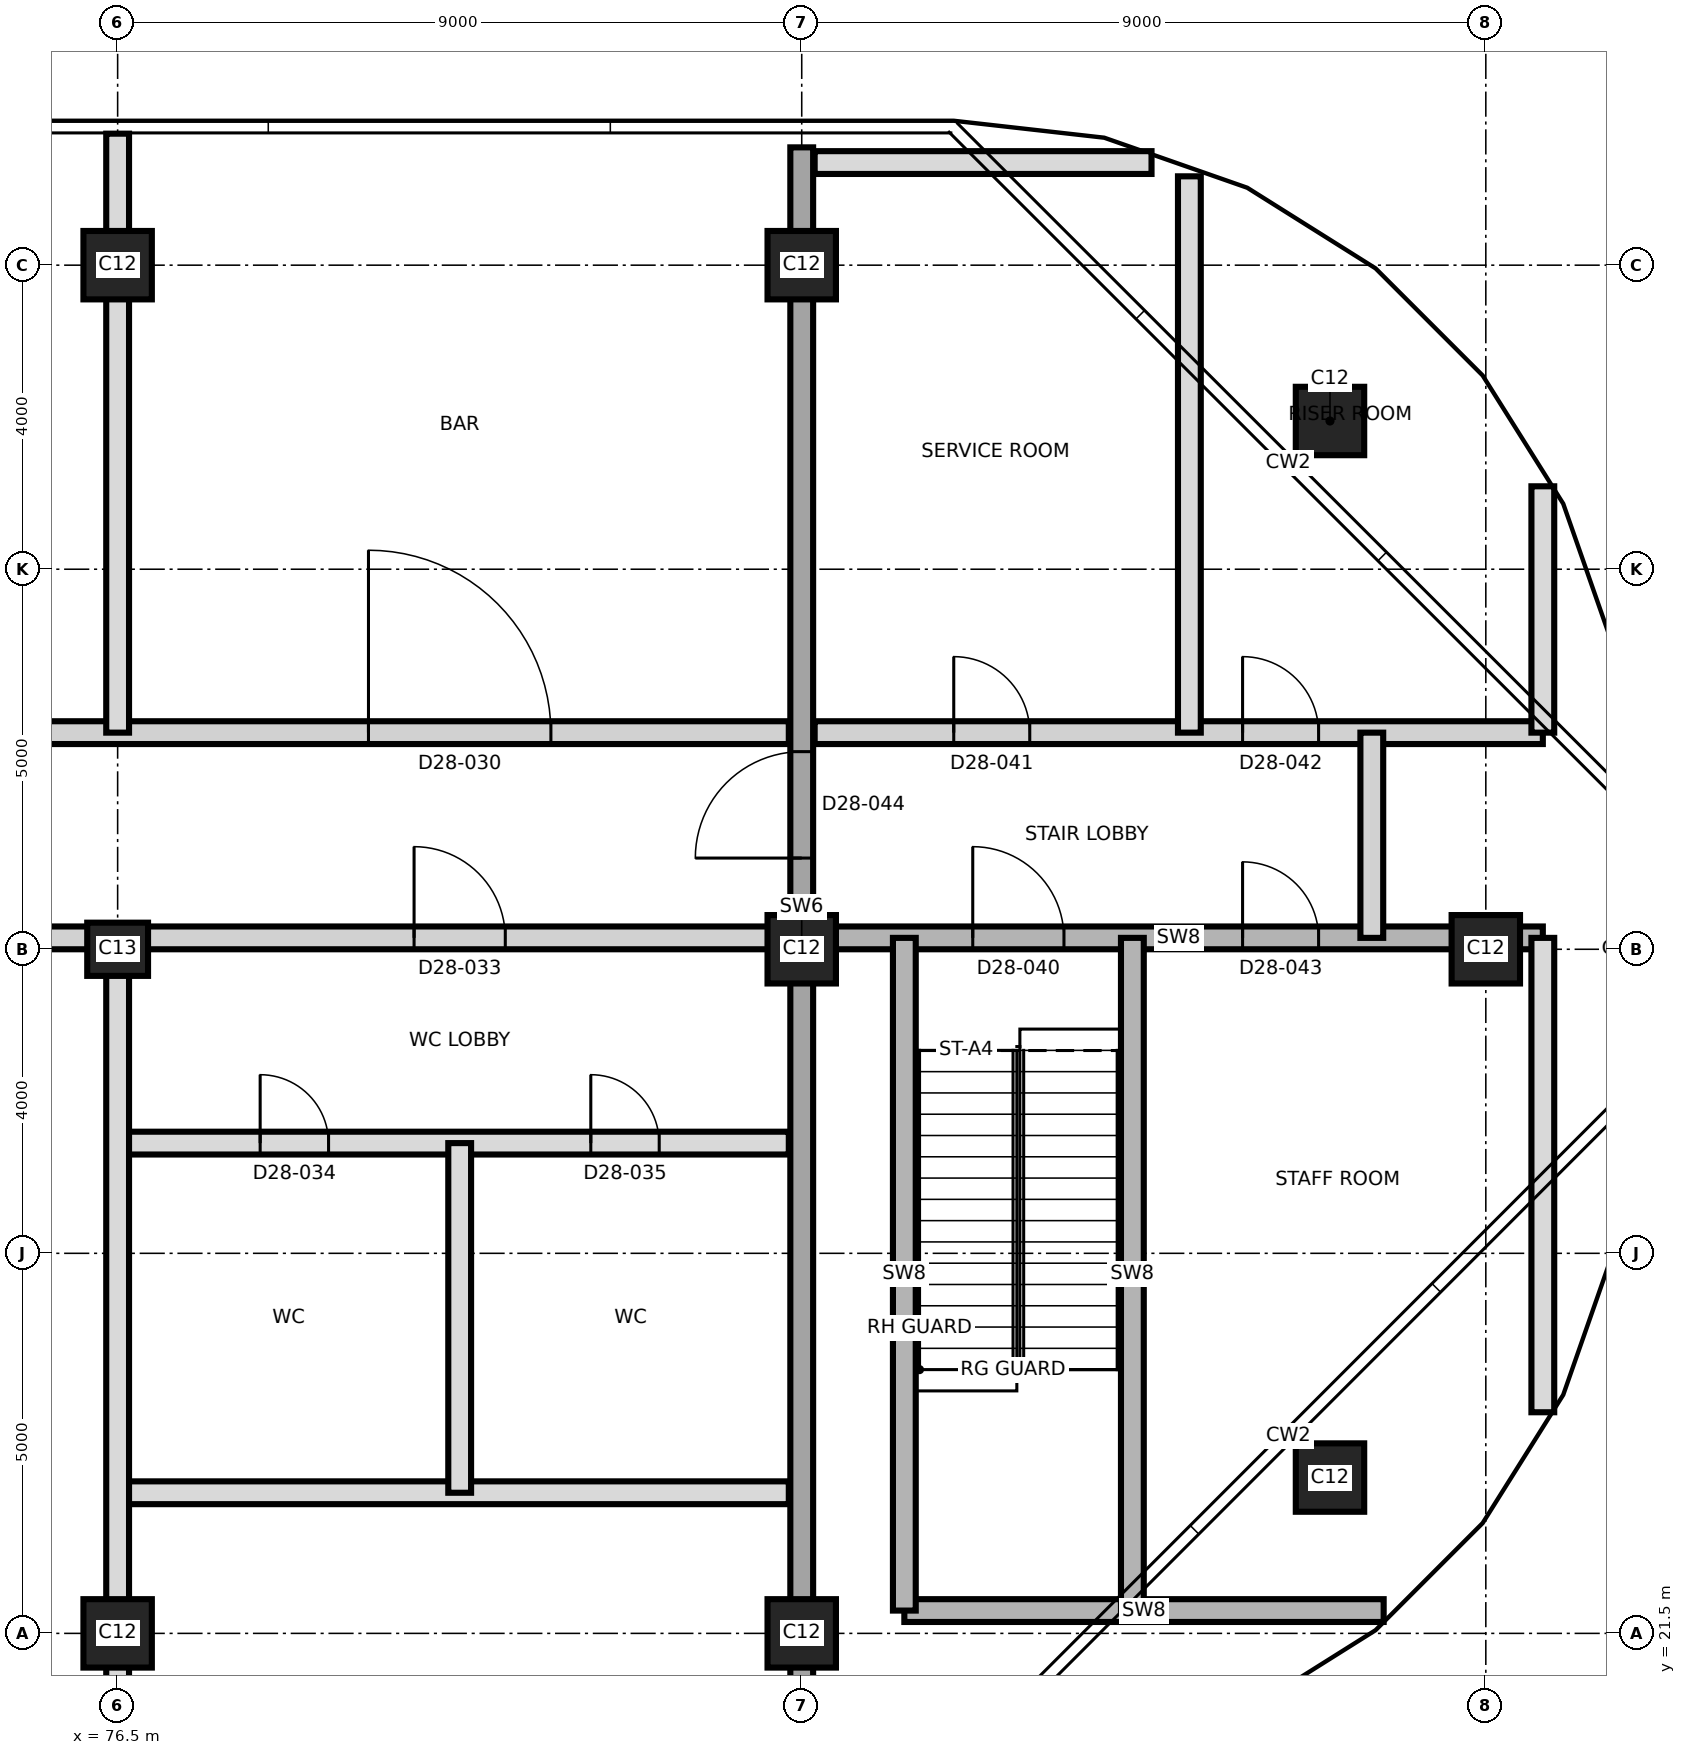
"""IFC4 building model, lengths in metres.
Left out: names, types, materials, properties, quantities, classifications, styles, units other than length and angle.
Written with IfcOpenShell. Run it as: python <this file> out.ifc"""

import sys

from ifc_helpers import new_model, si_unit, direction, frame, frame_2d, origin, origin_2d, place, context, subcontext, project, spatial, rectangle, extrude, element, fill, save


model = new_model("IFC4")
c1 = context("Model", 3, precision=1e-05, world=origin(), true_north=direction((0.0, 1.0)))
c2 = subcontext(c1, "Body", "Model", "MODEL_VIEW")
j1 = project(units=[si_unit("LENGTHUNIT", "METRE"), si_unit("PLANEANGLEUNIT", "RADIAN")], contexts=[c1])
p1 = place(None, origin())
s1 = spatial("IfcSite", under=j1, at=p1, CompositionType="ELEMENT")
p2 = place(p1, origin())
s2 = spatial("IfcBuilding", under=s1, at=p2, CompositionType="ELEMENT")
p3 = place(p2, frame((0.0, 0.0, 249.4)))
s3 = spatial("IfcBuildingStorey", under=s2, at=p3, CompositionType="ELEMENT", Elevation=249.4)
for number, where, z_axis, x_axis in (
    (1, (76.5, 21.5, 0.0), (0.0, 0.0, 1.0), (1.0, 0.0, 0.0)),
    (2, (85.5, 21.5, 0.0), (0.0, 0.0, 1.0), (1.0, 0.0, 0.0)),
    (3, (92.45, 23.55, 0.0), (0.0, 0.0, 1.0), (1.0, 0.0, 0.0)),
):
    element("IfcColumn", number, at=place(p3, frame(where, z_axis=z_axis, x_axis=x_axis)), inside=s3, PredefinedType="COLUMN", context=c2, shape_type="SweptSolid", body=[
        extrude(rectangle(XDim=0.9, YDim=0.9, at=origin_2d()), origin(), (0.0, 0.0, 1.0), 5.5),
    ])
p4 = place(p3, frame((76.5, 30.5, 0.0), z_axis=(0.0, 0.0, 1.0), x_axis=(1.0, 0.0, 0.0)))
e4 = element("IfcColumn", 4, at=p4, inside=s3, PredefinedType="COLUMN", context=c2, shape_type="SweptSolid", body=[
    extrude(rectangle(XDim=0.8, YDim=0.7, at=origin_2d()), origin(), (0.0, 0.0, 1.0), 5.5),
])
for number, where, z_axis, x_axis in (
    (5, (85.5, 30.5, 0.0), (0.0, 0.0, 1.0), (1.0, 0.0, 0.0)),
    (6, (94.5, 30.5, 0.0), (0.0, 0.0, 1.0), (1.0, 0.0, 0.0)),
    (7, (92.45, 37.45, 0.0), (0.0, 0.0, 1.0), (1.0, 0.0, 0.0)),
    (8, (76.5, 39.5, 0.0), (0.0, 0.0, 1.0), (1.0, 0.0, 0.0)),
    (9, (85.5, 39.5, 0.0), (0.0, 0.0, 1.0), (1.0, 0.0, 0.0)),
):
    element("IfcColumn", number, at=place(p3, frame(where, z_axis=z_axis, x_axis=x_axis)), inside=s3, PredefinedType="COLUMN", context=c2, shape_type="SweptSolid", body=[
        extrude(rectangle(XDim=0.9, YDim=0.9, at=origin_2d()), origin(), (0.0, 0.0, 1.0), 5.5),
    ])
p5 = place(p3, frame((85.5, 19.95, 0.0), z_axis=(0.0, 0.0, 1.0), x_axis=(0.0, 1.0, 0.0)))
e10 = element("IfcWall", 10, at=p5, inside=s3, PredefinedType="SHEAR", context=c2, shape_type="SweptSolid", body=[
    extrude(rectangle(XDim=21.1, YDim=0.3, at=frame_2d((10.55, 0.0))), origin(), (0.0, 0.0, 1.0), 5.5),
])
p6 = place(p5, frame((11.75, 0.0, 0.0)))
e11 = element("IfcOpeningElement", 11, at=p6, cuts=e10, PredefinedType="OPENING", context=c2, shape_type="SweptSolid", body=[
    extrude(rectangle(XDim=1.4, YDim=2.1, at=frame_2d((0.7, 1.05))), frame((0.0, 0.16, 0.0), z_axis=(0.0, -1.0, 0.0), x_axis=(1.0, 0.0, 0.0)), (0.0, 0.0, 1.0), 0.32),
])
p7 = place(p3, frame((86.85, 21.8, 0.0), z_axis=(0.0, 0.0, 1.0), x_axis=(1.0, 0.0, 0.0)))
e12 = element("IfcWall", 12, at=p7, inside=s3, PredefinedType="SHEAR", context=c2, shape_type="SweptSolid", body=[
    extrude(rectangle(XDim=6.306, YDim=0.3, at=frame_2d((3.153, 0.0))), origin(), (0.0, 0.0, 1.0), 5.2),
])
p8 = place(p3, frame((76.5, 23.35, 0.0), z_axis=(0.0, 0.0, 1.0), x_axis=(1.0, 0.0, 0.0)))
e13 = element("IfcWall", 13, at=p8, inside=s3, PredefinedType="PARTITIONING", context=c2, shape_type="SweptSolid", body=[
    extrude(rectangle(XDim=8.83, YDim=0.3, at=frame_2d((4.415, 0.0))), origin(), (0.0, 0.0, 1.0), 5.2),
])
p9 = place(p3, frame((76.5, 27.95, 0.0), z_axis=(0.0, 0.0, 1.0), x_axis=(1.0, 0.0, 0.0)))
e14 = element("IfcWall", 14, at=p9, inside=s3, PredefinedType="PARTITIONING", context=c2, shape_type="SweptSolid", body=[
    extrude(rectangle(XDim=8.83, YDim=0.3, at=frame_2d((4.415, 0.0))), origin(), (0.0, 0.0, 1.0), 5.2),
])
p10 = place(p9, frame((1.875, 0.0, 0.0)))
e15 = element("IfcOpeningElement", 15, at=p10, cuts=e14, PredefinedType="OPENING", context=c2, shape_type="SweptSolid", body=[
    extrude(rectangle(XDim=0.9, YDim=2.1, at=frame_2d((0.45, 1.05))), frame((0.0, 0.16, 0.0), z_axis=(0.0, -1.0, 0.0), x_axis=(1.0, 0.0, 0.0)), (0.0, 0.0, 1.0), 0.32),
])
p11 = place(p9, frame((6.225, 0.0, 0.0)))
e16 = element("IfcOpeningElement", 16, at=p11, cuts=e14, PredefinedType="OPENING", context=c2, shape_type="SweptSolid", body=[
    extrude(rectangle(XDim=0.9, YDim=2.1, at=frame_2d((0.45, 1.05))), frame((0.0, 0.16, 0.0), z_axis=(0.0, -1.0, 0.0), x_axis=(1.0, 0.0, 0.0)), (0.0, 0.0, 1.0), 0.32),
])
p12 = place(p3, frame((58.55, 30.65, 0.0), z_axis=(0.0, 0.0, 1.0), x_axis=(1.0, 0.0, 0.0)))
e17 = element("IfcWall", 17, at=p12, inside=s3, PredefinedType="PARTITIONING", context=c2, shape_type="SweptSolid", body=[
    extrude(rectangle(XDim=26.78, YDim=0.3, at=frame_2d((13.39, 0.0))), origin(), (0.0, 0.0, 1.0), 5.2),
])
p13 = place(p12, frame((3.75, 0.0, 0.0)))
e18 = element("IfcOpeningElement", 18, at=p13, cuts=e17, PredefinedType="OPENING", context=c2, shape_type="SweptSolid", body=[
    extrude(rectangle(XDim=1.4, YDim=2.1, at=frame_2d((0.7, 1.05))), frame((0.0, 0.16, 0.0), z_axis=(0.0, -1.0, 0.0), x_axis=(1.0, 0.0, 0.0)), (0.0, 0.0, 1.0), 0.32),
])
p14 = place(p12, frame((12.75, 0.0, 0.0)))
e19 = element("IfcOpeningElement", 19, at=p14, cuts=e17, PredefinedType="OPENING", context=c2, shape_type="SweptSolid", body=[
    extrude(rectangle(XDim=1.4, YDim=2.1, at=frame_2d((0.7, 1.05))), frame((0.0, 0.16, 0.0), z_axis=(0.0, -1.0, 0.0), x_axis=(1.0, 0.0, 0.0)), (0.0, 0.0, 1.0), 0.32),
])
p15 = place(p12, frame((21.85, 0.0, 0.0)))
e20 = element("IfcOpeningElement", 20, at=p15, cuts=e17, PredefinedType="OPENING", context=c2, shape_type="SweptSolid", body=[
    extrude(rectangle(XDim=1.2, YDim=2.1, at=frame_2d((0.6, 1.05))), frame((0.0, 0.16, 0.0), z_axis=(0.0, -1.0, 0.0), x_axis=(1.0, 0.0, 0.0)), (0.0, 0.0, 1.0), 0.32),
])
p16 = place(p3, frame((85.67, 30.65, 0.0), z_axis=(0.0, 0.0, 1.0), x_axis=(1.0, 0.0, 0.0)))
e21 = element("IfcWall", 21, at=p16, inside=s3, PredefinedType="SHEAR", context=c2, shape_type="SweptSolid", body=[
    extrude(rectangle(XDim=9.58, YDim=0.3, at=frame_2d((4.79, 0.0))), origin(), (0.0, 0.0, 1.0), 5.2),
])
p17 = place(p16, frame((2.08, 0.0, 0.0)))
e22 = element("IfcOpeningElement", 22, at=p17, cuts=e21, PredefinedType="OPENING", context=c2, shape_type="SweptSolid", body=[
    extrude(rectangle(XDim=1.2, YDim=2.1, at=frame_2d((0.6, 1.05))), frame((0.0, 0.16, 0.0), z_axis=(0.0, -1.0, 0.0), x_axis=(1.0, 0.0, 0.0)), (0.0, 0.0, 1.0), 0.32),
])
p18 = place(p16, frame((5.63, 0.0, 0.0)))
e23 = element("IfcOpeningElement", 23, at=p18, cuts=e21, PredefinedType="OPENING", context=c2, shape_type="SweptSolid", body=[
    extrude(rectangle(XDim=1.0, YDim=2.1, at=frame_2d((0.5, 1.05))), frame((0.0, 0.16, 0.0), z_axis=(0.0, -1.0, 0.0), x_axis=(1.0, 0.0, 0.0)), (0.0, 0.0, 1.0), 0.32),
])
p19 = place(p3, frame((58.55, 33.35, 0.0), z_axis=(0.0, 0.0, 1.0), x_axis=(1.0, 0.0, 0.0)))
e24 = element("IfcWall", 24, at=p19, inside=s3, PredefinedType="PARTITIONING", context=c2, shape_type="SweptSolid", body=[
    extrude(rectangle(XDim=26.78, YDim=0.3, at=frame_2d((13.39, 0.0))), origin(), (0.0, 0.0, 1.0), 5.2),
])
p20 = place(p19, frame((7.75, 0.0, 0.0)))
e25 = element("IfcOpeningElement", 25, at=p20, cuts=e24, PredefinedType="OPENING", context=c2, shape_type="SweptSolid", body=[
    extrude(rectangle(XDim=2.4, YDim=2.4, at=frame_2d((1.2, 1.2))), frame((0.0, 0.16, 0.0), z_axis=(0.0, -1.0, 0.0), x_axis=(1.0, 0.0, 0.0)), (0.0, 0.0, 1.0), 0.32),
])
p21 = place(p19, frame((21.25, 0.0, 0.0)))
e26 = element("IfcOpeningElement", 26, at=p21, cuts=e24, PredefinedType="OPENING", context=c2, shape_type="SweptSolid", body=[
    extrude(rectangle(XDim=2.4, YDim=2.4, at=frame_2d((1.2, 1.2))), frame((0.0, 0.16, 0.0), z_axis=(0.0, -1.0, 0.0), x_axis=(1.0, 0.0, 0.0)), (0.0, 0.0, 1.0), 0.32),
])
p22 = place(p3, frame((85.67, 33.35, 0.0), z_axis=(0.0, 0.0, 1.0), x_axis=(1.0, 0.0, 0.0)))
e27 = element("IfcWall", 27, at=p22, inside=s3, PredefinedType="PARTITIONING", context=c2, shape_type="SweptSolid", body=[
    extrude(rectangle(XDim=9.58, YDim=0.3, at=frame_2d((4.79, 0.0))), origin(), (0.0, 0.0, 1.0), 5.2),
])
p23 = place(p22, frame((1.83, 0.0, 0.0)))
e28 = element("IfcOpeningElement", 28, at=p23, cuts=e27, PredefinedType="OPENING", context=c2, shape_type="SweptSolid", body=[
    extrude(rectangle(XDim=1.0, YDim=2.1, at=frame_2d((0.5, 1.05))), frame((0.0, 0.16, 0.0), z_axis=(0.0, -1.0, 0.0), x_axis=(1.0, 0.0, 0.0)), (0.0, 0.0, 1.0), 0.32),
])
p24 = place(p22, frame((5.63, 0.0, 0.0)))
e29 = element("IfcOpeningElement", 29, at=p24, cuts=e27, PredefinedType="OPENING", context=c2, shape_type="SweptSolid", body=[
    extrude(rectangle(XDim=1.0, YDim=2.1, at=frame_2d((0.5, 1.05))), frame((0.0, 0.16, 0.0), z_axis=(0.0, -1.0, 0.0), x_axis=(1.0, 0.0, 0.0)), (0.0, 0.0, 1.0), 0.32),
])
p25 = place(p3, frame((85.67, 40.85, 0.0), z_axis=(0.0, 0.0, 1.0), x_axis=(1.0, 0.0, 0.0)))
e30 = element("IfcWall", 30, at=p25, inside=s3, PredefinedType="PARTITIONING", context=c2, shape_type="SweptSolid", body=[
    extrude(rectangle(XDim=4.432, YDim=0.3, at=frame_2d((2.216, 0.0))), origin(), (0.0, 0.0, 1.0), 5.2),
])
p26 = place(p3, frame((76.5, 19.77, 0.0), z_axis=(0.0, 0.0, 1.0), x_axis=(0.0, 1.0, 0.0)))
e31 = element("IfcWall", 31, at=p26, inside=s3, PredefinedType="PARTITIONING", context=c2, shape_type="SweptSolid", body=[
    extrude(rectangle(XDim=10.88, YDim=0.3, at=frame_2d((5.44, 0.0))), origin(), (0.0, 0.0, 1.0), 5.2),
])
p27 = place(p3, frame((76.5, 33.35, 0.0), z_axis=(0.0, 0.0, 1.0), x_axis=(0.0, 1.0, 0.0)))
e32 = element("IfcWall", 32, at=p27, inside=s3, PredefinedType="PARTITIONING", context=c2, shape_type="SweptSolid", body=[
    extrude(rectangle(XDim=7.88, YDim=0.3, at=frame_2d((3.94, 0.0))), origin(), (0.0, 0.0, 1.0), 5.2),
])
p28 = place(p3, frame((81.0, 23.35, 0.0), z_axis=(0.0, 0.0, 1.0), x_axis=(0.0, 1.0, 0.0)))
e33 = element("IfcWall", 33, at=p28, inside=s3, PredefinedType="PARTITIONING", context=c2, shape_type="SweptSolid", body=[
    extrude(rectangle(XDim=4.6, YDim=0.3, at=frame_2d((2.3, 0.0))), origin(), (0.0, 0.0, 1.0), 5.2),
])
for number, where, z_axis, x_axis in (
    (34, (86.85, 21.8, 0.0), (0.0, 0.0, 1.0), (0.0, 1.0, 0.0)),
    (35, (89.85, 21.8, 0.0), (0.0, 0.0, 1.0), (0.0, 1.0, 0.0)),
):
    element("IfcWall", number, at=place(p3, frame(where, z_axis=z_axis, x_axis=x_axis)), inside=s3, PredefinedType="SHEAR", context=c2, shape_type="SweptSolid", body=[
        extrude(rectangle(XDim=8.85, YDim=0.3, at=frame_2d((4.425, 0.0))), origin(), (0.0, 0.0, 1.0), 5.2),
    ])
p29 = place(p3, frame((90.6, 33.35, 0.0), z_axis=(0.0, 0.0, 1.0), x_axis=(0.0, 1.0, 0.0)))
e36 = element("IfcWall", 36, at=p29, inside=s3, PredefinedType="PARTITIONING", context=c2, shape_type="SweptSolid", body=[
    extrude(rectangle(XDim=7.319, YDim=0.3, at=frame_2d((3.659, 0.0))), origin(), (0.0, 0.0, 1.0), 5.2),
])
p30 = place(p3, frame((93.0, 30.65, 0.0), z_axis=(0.0, 0.0, 1.0), x_axis=(0.0, 1.0, 0.0)))
e37 = element("IfcWall", 37, at=p30, inside=s3, PredefinedType="PARTITIONING", context=c2, shape_type="SweptSolid", body=[
    extrude(rectangle(XDim=2.7, YDim=0.3, at=frame_2d((1.35, 0.0))), origin(), (0.0, 0.0, 1.0), 5.2),
])
p31 = place(p3, frame((95.25, 24.409, 0.0), z_axis=(0.0, 0.0, 1.0), x_axis=(0.0, 1.0, 0.0)))
e38 = element("IfcWall", 38, at=p31, inside=s3, PredefinedType="PARTITIONING", context=c2, shape_type="SweptSolid", body=[
    extrude(rectangle(XDim=6.241, YDim=0.3, at=frame_2d((3.121, 0.0))), origin(), (0.0, 0.0, 1.0), 5.2),
])
p32 = place(p3, frame((95.25, 33.35, 0.0), z_axis=(0.0, 0.0, 1.0), x_axis=(0.0, 1.0, 0.0)))
e39 = element("IfcWall", 39, at=p32, inside=s3, PredefinedType="PARTITIONING", context=c2, shape_type="SweptSolid", body=[
    extrude(rectangle(XDim=3.241, YDim=0.3, at=frame_2d((1.621, 0.0))), origin(), (0.0, 0.0, 1.0), 5.2),
])
p33 = place(p21, origin())
e40 = element("IfcDoor", 40, at=p33, inside=s3, OperationType="SINGLE_SWING_LEFT", PredefinedType="DOOR", context=c2, shape_type="SweptSolid", body=[
    extrude(rectangle(XDim=2.4, YDim=2.4, at=frame_2d((1.2, 1.2))), frame((0.0, 0.025, 0.0), z_axis=(0.0, -1.0, 0.0), x_axis=(1.0, 0.0, 0.0)), (0.0, 0.0, 1.0), 0.05),
])
fill(e26, e40)
p34 = place(p15, origin())
e41 = element("IfcDoor", 41, at=p34, inside=s3, OperationType="SINGLE_SWING_LEFT", PredefinedType="DOOR", context=c2, shape_type="SweptSolid", body=[
    extrude(rectangle(XDim=1.2, YDim=2.1, at=frame_2d((0.6, 1.05))), frame((0.0, 0.025, 0.0), z_axis=(0.0, -1.0, 0.0), x_axis=(1.0, 0.0, 0.0)), (0.0, 0.0, 1.0), 0.05),
])
fill(e20, e41)
p35 = place(p10, origin())
e42 = element("IfcDoor", 42, at=p35, inside=s3, OperationType="SINGLE_SWING_LEFT", PredefinedType="DOOR", context=c2, shape_type="SweptSolid", body=[
    extrude(rectangle(XDim=0.9, YDim=2.1, at=frame_2d((0.45, 1.05))), frame((0.0, 0.025, 0.0), z_axis=(0.0, -1.0, 0.0), x_axis=(1.0, 0.0, 0.0)), (0.0, 0.0, 1.0), 0.05),
])
fill(e15, e42)
p36 = place(p11, origin())
e43 = element("IfcDoor", 43, at=p36, inside=s3, OperationType="SINGLE_SWING_RIGHT", PredefinedType="DOOR", context=c2, shape_type="SweptSolid", body=[
    extrude(rectangle(XDim=0.9, YDim=2.1, at=frame_2d((0.45, 1.05))), frame((0.0, 0.025, 0.0), z_axis=(0.0, -1.0, 0.0), x_axis=(1.0, 0.0, 0.0)), (0.0, 0.0, 1.0), 0.05),
])
fill(e16, e43)
p37 = place(p17, origin())
e44 = element("IfcDoor", 44, at=p37, inside=s3, OperationType="SINGLE_SWING_LEFT", PredefinedType="DOOR", context=c2, shape_type="SweptSolid", body=[
    extrude(rectangle(XDim=1.2, YDim=2.1, at=frame_2d((0.6, 1.05))), frame((0.0, 0.025, 0.0), z_axis=(0.0, -1.0, 0.0), x_axis=(1.0, 0.0, 0.0)), (0.0, 0.0, 1.0), 0.05),
])
fill(e22, e44)
p38 = place(p23, origin())
e45 = element("IfcDoor", 45, at=p38, inside=s3, OperationType="SINGLE_SWING_LEFT", PredefinedType="DOOR", context=c2, shape_type="SweptSolid", body=[
    extrude(rectangle(XDim=1.0, YDim=2.1, at=frame_2d((0.5, 1.05))), frame((0.0, 0.025, 0.0), z_axis=(0.0, -1.0, 0.0), x_axis=(1.0, 0.0, 0.0)), (0.0, 0.0, 1.0), 0.05),
])
fill(e28, e45)
p39 = place(p24, origin())
e46 = element("IfcDoor", 46, at=p39, inside=s3, OperationType="SINGLE_SWING_RIGHT", PredefinedType="DOOR", context=c2, shape_type="SweptSolid", body=[
    extrude(rectangle(XDim=1.0, YDim=2.1, at=frame_2d((0.5, 1.05))), frame((0.0, 0.025, 0.0), z_axis=(0.0, -1.0, 0.0), x_axis=(1.0, 0.0, 0.0)), (0.0, 0.0, 1.0), 0.05),
])
fill(e29, e46)
p40 = place(p18, origin())
e47 = element("IfcDoor", 47, at=p40, inside=s3, OperationType="SINGLE_SWING_LEFT", PredefinedType="DOOR", context=c2, shape_type="SweptSolid", body=[
    extrude(rectangle(XDim=1.0, YDim=2.1, at=frame_2d((0.5, 1.05))), frame((0.0, 0.025, 0.0), z_axis=(0.0, -1.0, 0.0), x_axis=(1.0, 0.0, 0.0)), (0.0, 0.0, 1.0), 0.05),
])
fill(e23, e47)
p41 = place(p6, origin())
e48 = element("IfcDoor", 48, at=p41, inside=s3, OperationType="SINGLE_SWING_RIGHT", PredefinedType="DOOR", context=c2, shape_type="SweptSolid", body=[
    extrude(rectangle(XDim=1.4, YDim=2.1, at=frame_2d((0.7, 1.05))), frame((0.0, 0.025, 0.0), z_axis=(0.0, -1.0, 0.0), x_axis=(1.0, 0.0, 0.0)), (0.0, 0.0, 1.0), 0.05),
])
fill(e11, e48)
save(model, sys.argv[1])
